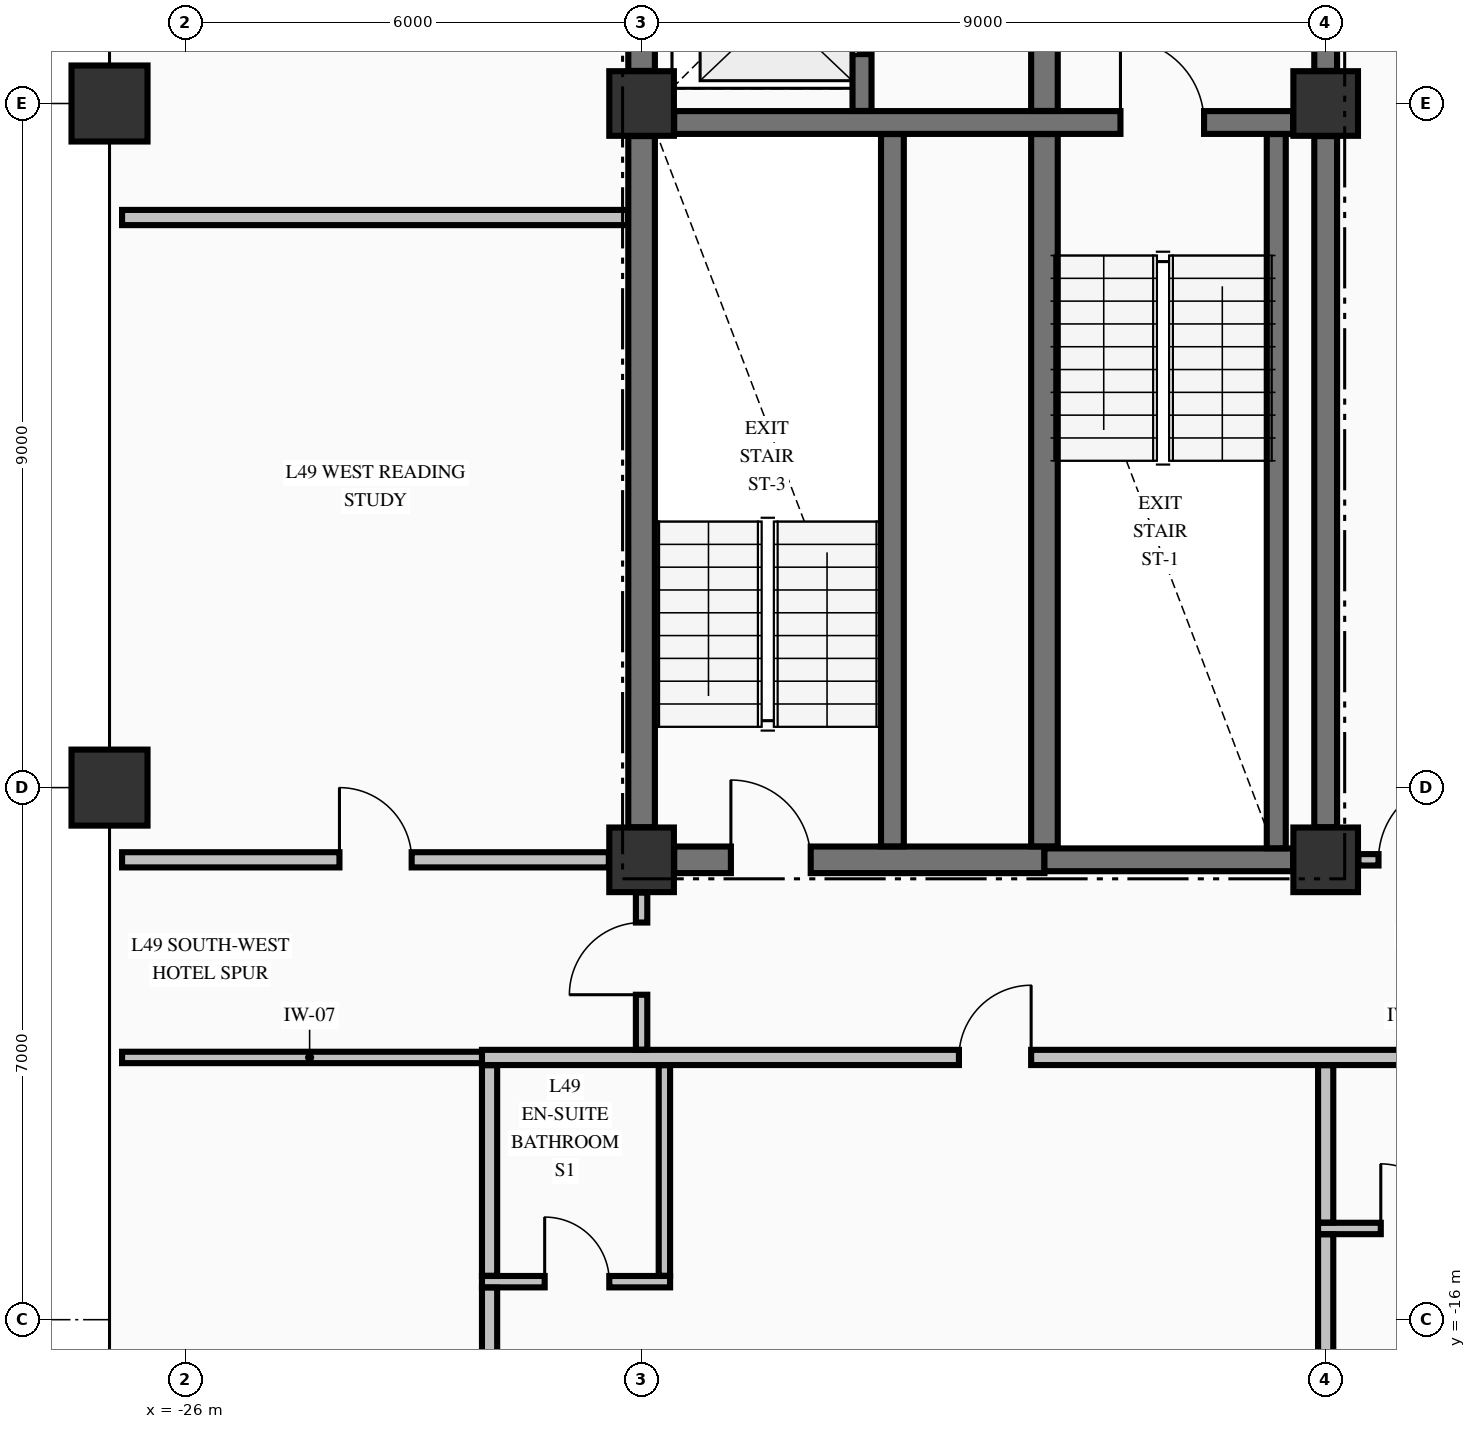
"""IFC4 building model, lengths in metres.
Left out: names, types, materials, properties, quantities, classifications, styles, units other than length and angle.
Written with IfcOpenShell. Run it as: python <this file> out.ifc"""

import sys

from ifc_helpers import new_model, si_unit, direction, frame, frame_2d, origin, origin_2d, place, context, subcontext, project, spatial, rectangle, extrude, element, fill, save


model = new_model("IFC4")
c1 = context("Model", 3, precision=1e-05, world=origin(), true_north=direction((0.0, 1.0)))
c2 = subcontext(c1, "Body", "Model", "MODEL_VIEW")
j1 = project(units=[si_unit("LENGTHUNIT", "METRE"), si_unit("PLANEANGLEUNIT", "RADIAN")], contexts=[c1])
p1 = place(None, origin())
s1 = spatial("IfcSite", under=j1, at=p1, CompositionType="ELEMENT")
p2 = place(p1, origin())
s2 = spatial("IfcBuilding", under=s1, at=p2, CompositionType="ELEMENT")
p3 = place(p2, frame((0.0, 0.0, 191.46)))
s3 = spatial("IfcBuildingStorey", under=s2, at=p3, CompositionType="ELEMENT", Elevation=191.46)
for number, where, z_axis, x_axis in (
    (1, (-27.0, -9.0, -0.425), (0.0, 0.0, 1.0), (1.0, 0.0, 0.0)),
    (2, (-27.0, 0.0, -0.425), (0.0, 0.0, 1.0), (1.0, 0.0, 0.0)),
):
    element("IfcColumn", number, at=place(p3, frame(where, z_axis=z_axis, x_axis=x_axis)), inside=s3, PredefinedType="COLUMN", context=c2, shape_type="SweptSolid", body=[
        extrude(rectangle(XDim=1.0, YDim=1.0, at=origin_2d()), origin(), (0.0, 0.0, 1.0), 3.55),
    ])
for number, where, z_axis, x_axis in (
    (3, (-20.0, -9.95, -0.425), (0.0, 0.0, 1.0), (1.0, 0.0, 0.0)),
    (4, (-11.0, -9.95, -0.425), (0.0, 0.0, 1.0), (1.0, 0.0, 0.0)),
    (5, (-11.0, 0.0, -0.425), (0.0, 0.0, 1.0), (1.0, 0.0, 0.0)),
    (6, (-20.0, 0.0, -0.425), (0.0, 0.0, 1.0), (1.0, 0.0, 0.0)),
):
    element("IfcColumn", number, at=place(p3, frame(where, z_axis=z_axis, x_axis=x_axis)), inside=s3, PredefinedType="COLUMN", context=c2, shape_type="SweptSolid", body=[
        extrude(rectangle(XDim=0.85, YDim=0.85, at=origin_2d()), origin(), (0.0, 0.0, 1.0), 3.55),
    ])
p4 = place(p3, frame((-19.571, -9.95, 0.0), z_axis=(0.0, 0.0, 1.0), x_axis=(1.0, 0.0, 0.0)))
e7 = element("IfcWall", 7, at=p4, inside=s3, PredefinedType="SHEAR", context=c2, shape_type="SweptSolid", body=[
    extrude(rectangle(XDim=4.871, YDim=0.35, at=frame_2d((2.436, 0.0))), origin(), (0.0, 0.0, 1.0), 3.125),
])
p5 = place(p4, frame((0.746, 0.0, 0.0)))
e8 = element("IfcOpeningElement", 8, at=p5, cuts=e7, PredefinedType="OPENING", context=c2, shape_type="SweptSolid", body=[
    extrude(rectangle(XDim=1.05, YDim=2.15, at=frame_2d((0.525, 1.075))), frame((0.0, 0.185, 0.0), z_axis=(0.0, -1.0, 0.0), x_axis=(1.0, 0.0, 0.0)), (0.0, 0.0, 1.0), 0.37),
])
p6 = place(p3, frame((-14.7, -9.95, 0.0), z_axis=(0.0, 0.0, 1.0), x_axis=(1.0, 0.0, 0.0)))
e9 = element("IfcWall", 9, at=p6, inside=s3, PredefinedType="SHEAR", context=c2, shape_type="SweptSolid", body=[
    extrude(rectangle(XDim=3.271, YDim=0.3, at=frame_2d((1.635, 0.0))), origin(), (0.0, 0.0, 1.0), 3.125),
])
p7 = place(p3, frame((-19.571, -0.25, 0.0), z_axis=(0.0, 0.0, 1.0), x_axis=(1.0, 0.0, 0.0)))
e10 = element("IfcWall", 10, at=p7, inside=s3, PredefinedType="SHEAR", context=c2, shape_type="SweptSolid", body=[
    extrude(rectangle(XDim=8.142, YDim=0.3, at=frame_2d((4.071, 0.0))), origin(), (0.0, 0.0, 1.0), 3.125),
])
p8 = place(p7, frame((5.871, 0.0, 0.0)))
e11 = element("IfcOpeningElement", 11, at=p8, cuts=e10, PredefinedType="OPENING", context=c2, shape_type="SweptSolid", body=[
    extrude(rectangle(XDim=1.1, YDim=2.15, at=frame_2d((0.55, 1.075))), frame((0.0, 0.16, 0.0), z_axis=(0.0, -1.0, 0.0), x_axis=(1.0, 0.0, 0.0)), (0.0, 0.0, 1.0), 0.32),
])
p9 = place(p3, frame((-22.1, -15.5, 0.0), z_axis=(0.0, 0.0, 1.0), x_axis=(1.0, 0.0, 0.0)))
e12 = element("IfcWall", 12, at=p9, inside=s3, PredefinedType="PARTITIONING", context=c2, shape_type="SweptSolid", body=[
    extrude(rectangle(XDim=2.475, YDim=0.15, at=frame_2d((1.238, 0.0))), origin(), (0.0, 0.0, 1.0), 3.125),
])
p10 = place(p9, frame((0.825, 0.0, 0.0)))
e13 = element("IfcOpeningElement", 13, at=p10, cuts=e12, PredefinedType="OPENING", context=c2, shape_type="SweptSolid", body=[
    extrude(rectangle(XDim=0.85, YDim=2.1, at=frame_2d((0.425, 1.05))), frame((0.0, 0.085, 0.0), z_axis=(0.0, -1.0, 0.0), x_axis=(1.0, 0.0, 0.0)), (0.0, 0.0, 1.0), 0.17),
])
p11 = place(p3, frame((-11.1, -14.8, 0.0), z_axis=(0.0, 0.0, 1.0), x_axis=(1.0, 0.0, 0.0)))
e14 = element("IfcWall", 14, at=p11, inside=s3, PredefinedType="PARTITIONING", context=c2, shape_type="SweptSolid", body=[
    extrude(rectangle(XDim=2.475, YDim=0.15, at=frame_2d((1.238, 0.0))), origin(), (0.0, 0.0, 1.0), 3.125),
])
p12 = place(p11, frame((0.825, 0.0, 0.0)))
e15 = element("IfcOpeningElement", 15, at=p12, cuts=e14, PredefinedType="OPENING", context=c2, shape_type="SweptSolid", body=[
    extrude(rectangle(XDim=0.85, YDim=2.1, at=frame_2d((0.425, 1.05))), frame((0.0, 0.085, 0.0), z_axis=(0.0, -1.0, 0.0), x_axis=(1.0, 0.0, 0.0)), (0.0, 0.0, 1.0), 0.17),
])
p13 = place(p3, frame((-26.835, -12.55, 0.0), z_axis=(0.0, 0.0, 1.0), x_axis=(1.0, 0.0, 0.0)))
e16 = element("IfcWall", 16, at=p13, inside=s3, PredefinedType="PARTITIONING", context=c2, shape_type="SweptSolid", body=[
    extrude(rectangle(XDim=4.935, YDim=0.15, at=frame_2d((2.468, 0.0))), origin(), (0.0, 0.0, 1.0), 3.125),
])
p14 = place(p3, frame((-22.1, -12.55, 0.0), z_axis=(0.0, 0.0, 1.0), x_axis=(1.0, 0.0, 0.0)))
e17 = element("IfcWall", 17, at=p14, inside=s3, PredefinedType="PARTITIONING", context=c2, shape_type="SweptSolid", body=[
    extrude(rectangle(XDim=39.2, YDim=0.2, at=frame_2d((19.6, 0.0))), origin(), (0.0, 0.0, 1.0), 3.125),
])
p15 = place(p14, frame((6.275, 0.0, 0.0)))
e18 = element("IfcOpeningElement", 18, at=p15, cuts=e17, PredefinedType="OPENING", context=c2, shape_type="SweptSolid", body=[
    extrude(rectangle(XDim=0.95, YDim=2.15, at=frame_2d((0.475, 1.075))), frame((0.0, 0.11, 0.0), z_axis=(0.0, -1.0, 0.0), x_axis=(1.0, 0.0, 0.0)), (0.0, 0.0, 1.0), 0.22),
])
p16 = place(p14, frame((17.275, 0.0, 0.0)))
e19 = element("IfcOpeningElement", 19, at=p16, cuts=e17, PredefinedType="OPENING", context=c2, shape_type="SweptSolid", body=[
    extrude(rectangle(XDim=0.95, YDim=2.15, at=frame_2d((0.475, 1.075))), frame((0.0, 0.11, 0.0), z_axis=(0.0, -1.0, 0.0), x_axis=(1.0, 0.0, 0.0)), (0.0, 0.0, 1.0), 0.22),
])
p17 = place(p14, frame((27.025, 0.0, 0.0)))
e20 = element("IfcOpeningElement", 20, at=p17, cuts=e17, PredefinedType="OPENING", context=c2, shape_type="SweptSolid", body=[
    extrude(rectangle(XDim=0.95, YDim=2.15, at=frame_2d((0.475, 1.075))), frame((0.0, 0.11, 0.0), z_axis=(0.0, -1.0, 0.0), x_axis=(1.0, 0.0, 0.0)), (0.0, 0.0, 1.0), 0.22),
])
p18 = place(p14, frame((35.525, 0.0, 0.0)))
e21 = element("IfcOpeningElement", 21, at=p18, cuts=e17, PredefinedType="OPENING", context=c2, shape_type="SweptSolid", body=[
    extrude(rectangle(XDim=0.95, YDim=2.15, at=frame_2d((0.475, 1.075))), frame((0.0, 0.11, 0.0), z_axis=(0.0, -1.0, 0.0), x_axis=(1.0, 0.0, 0.0)), (0.0, 0.0, 1.0), 0.22),
])
p19 = place(p3, frame((-26.835, -9.95, 0.0), z_axis=(0.0, 0.0, 1.0), x_axis=(1.0, 0.0, 0.0)))
e22 = element("IfcWall", 22, at=p19, inside=s3, PredefinedType="PARTITIONING", context=c2, shape_type="SweptSolid", body=[
    extrude(rectangle(XDim=6.404, YDim=0.2, at=frame_2d((3.202, 0.0))), origin(), (0.0, 0.0, 1.0), 3.125),
])
p20 = place(p19, frame((2.86, 0.0, 0.0)))
e23 = element("IfcOpeningElement", 23, at=p20, cuts=e22, PredefinedType="OPENING", context=c2, shape_type="SweptSolid", body=[
    extrude(rectangle(XDim=0.95, YDim=2.15, at=frame_2d((0.475, 1.075))), frame((0.0, 0.11, 0.0), z_axis=(0.0, -1.0, 0.0), x_axis=(1.0, 0.0, 0.0)), (0.0, 0.0, 1.0), 0.22),
])
p21 = place(p3, frame((-10.569, -9.95, 0.0), z_axis=(0.0, 0.0, 1.0), x_axis=(1.0, 0.0, 0.0)))
e24 = element("IfcWall", 24, at=p21, inside=s3, PredefinedType="PARTITIONING", context=c2, shape_type="SweptSolid", body=[
    extrude(rectangle(XDim=21.138, YDim=0.15, at=frame_2d((10.569, 0.0))), origin(), (0.0, 0.0, 1.0), 3.125),
])
p22 = place(p21, frame((0.264, 0.0, 0.0)))
e25 = element("IfcOpeningElement", 25, at=p22, cuts=e24, PredefinedType="OPENING", context=c2, shape_type="SweptSolid", body=[
    extrude(rectangle(XDim=1.05, YDim=2.15, at=frame_2d((0.525, 1.075))), frame((0.0, 0.085, 0.0), z_axis=(0.0, -1.0, 0.0), x_axis=(1.0, 0.0, 0.0)), (0.0, 0.0, 1.0), 0.17),
])
p23 = place(p21, frame((19.824, 0.0, 0.0)))
e26 = element("IfcOpeningElement", 26, at=p23, cuts=e24, PredefinedType="OPENING", context=c2, shape_type="SweptSolid", body=[
    extrude(rectangle(XDim=1.05, YDim=2.15, at=frame_2d((0.525, 1.075))), frame((0.0, 0.085, 0.0), z_axis=(0.0, -1.0, 0.0), x_axis=(1.0, 0.0, 0.0)), (0.0, 0.0, 1.0), 0.17),
])
p24 = place(p21, frame((12.874, 0.0, 0.0)))
e27 = element("IfcOpeningElement", 27, at=p24, cuts=e24, PredefinedType="OPENING", context=c2, shape_type="SweptSolid", body=[
    extrude(rectangle(XDim=0.95, YDim=2.15, at=frame_2d((0.475, 1.075))), frame((0.0, 0.085, 0.0), z_axis=(0.0, -1.0, 0.0), x_axis=(1.0, 0.0, 0.0)), (0.0, 0.0, 1.0), 0.17),
])
p25 = place(p3, frame((-26.835, -1.5, 0.0), z_axis=(0.0, 0.0, 1.0), x_axis=(1.0, 0.0, 0.0)))
e28 = element("IfcWall", 28, at=p25, inside=s3, PredefinedType="PARTITIONING", context=c2, shape_type="SweptSolid", body=[
    extrude(rectangle(XDim=6.657, YDim=0.2, at=frame_2d((3.329, 0.0))), origin(), (0.0, 0.0, 1.0), 3.125),
])
p26 = place(p3, frame((-20.0, -9.521, 0.0), z_axis=(0.0, 0.0, 1.0), x_axis=(0.0, 1.0, 0.0)))
e29 = element("IfcWall", 29, at=p26, inside=s3, PredefinedType="SHEAR", context=c2, shape_type="SweptSolid", body=[
    extrude(rectangle(XDim=9.092, YDim=0.35, at=frame_2d((4.546, 0.0))), origin(), (0.0, 0.0, 1.0), 3.125),
])
p27 = place(p3, frame((-20.0, 0.429, 0.0), z_axis=(0.0, 0.0, 1.0), x_axis=(0.0, 1.0, 0.0)))
e30 = element("IfcWall", 30, at=p27, inside=s3, PredefinedType="SHEAR", context=c2, shape_type="SweptSolid", body=[
    extrude(rectangle(XDim=2.094, YDim=0.35, at=frame_2d((1.047, 0.0))), origin(), (0.0, 0.0, 1.0), 3.125),
])
p28 = place(p3, frame((-17.1, -0.098, 0.0), z_axis=(0.0, 0.0, 1.0), x_axis=(0.0, 1.0, 0.0)))
e31 = element("IfcWall", 31, at=p28, inside=s3, PredefinedType="SOLIDWALL", context=c2, shape_type="SweptSolid", body=[
    extrude(rectangle(XDim=2.621, YDim=0.25, at=frame_2d((1.311, 0.0))), origin(), (0.0, 0.0, 1.0), 3.125),
])
p29 = place(p28, frame((0.748, 0.0, 0.0)))
e32 = element("IfcOpeningElement", 32, at=p29, cuts=e31, PredefinedType="OPENING", context=c2, shape_type="SweptSolid", body=[
    extrude(rectangle(XDim=1.1, YDim=2.2, at=frame_2d((0.55, 1.1))), frame((0.0, 0.135, 0.0), z_axis=(0.0, -1.0, 0.0), x_axis=(1.0, 0.0, 0.0)), (0.0, 0.0, 1.0), 0.27),
])
p30 = place(p3, frame((-16.7, -9.773, 0.0), z_axis=(0.0, 0.0, 1.0), x_axis=(0.0, 1.0, 0.0)))
e33 = element("IfcWall", 33, at=p30, inside=s3, PredefinedType="SHEAR", context=c2, shape_type="SweptSolid", body=[
    extrude(rectangle(XDim=9.371, YDim=0.3, at=frame_2d((4.686, 0.0))), origin(), (0.0, 0.0, 1.0), 3.125),
])
p31 = place(p3, frame((-14.7, -9.773, 0.0), z_axis=(0.0, 0.0, 1.0), x_axis=(0.0, 1.0, 0.0)))
e34 = element("IfcWall", 34, at=p31, inside=s3, PredefinedType="SHEAR", context=c2, shape_type="SweptSolid", body=[
    extrude(rectangle(XDim=9.371, YDim=0.35, at=frame_2d((4.686, 0.0))), origin(), (0.0, 0.0, 1.0), 3.125),
])
p32 = place(p3, frame((-14.7, -0.098, 0.0), z_axis=(0.0, 0.0, 1.0), x_axis=(0.0, 1.0, 0.0)))
e35 = element("IfcWall", 35, at=p32, inside=s3, PredefinedType="SHEAR", context=c2, shape_type="SweptSolid", body=[
    extrude(rectangle(XDim=2.846, YDim=0.35, at=frame_2d((1.423, 0.0))), origin(), (0.0, 0.0, 1.0), 3.125),
])
p33 = place(p3, frame((-11.65, -9.798, 0.0), z_axis=(0.0, 0.0, 1.0), x_axis=(0.0, 1.0, 0.0)))
e36 = element("IfcWall", 36, at=p33, inside=s3, PredefinedType="SOLIDWALL", context=c2, shape_type="SweptSolid", body=[
    extrude(rectangle(XDim=9.396, YDim=0.25, at=frame_2d((4.698, 0.0))), origin(), (0.0, 0.0, 1.0), 3.125),
])
p34 = place(p3, frame((-11.0, -9.521, 0.0), z_axis=(0.0, 0.0, 1.0), x_axis=(0.0, 1.0, 0.0)))
e37 = element("IfcWall", 37, at=p34, inside=s3, PredefinedType="SHEAR", context=c2, shape_type="SweptSolid", body=[
    extrude(rectangle(XDim=9.092, YDim=0.3, at=frame_2d((4.546, 0.0))), origin(), (0.0, 0.0, 1.0), 3.125),
])
p35 = place(p3, frame((-11.0, 0.429, 0.0), z_axis=(0.0, 0.0, 1.0), x_axis=(0.0, 1.0, 0.0)))
e38 = element("IfcWall", 38, at=p35, inside=s3, PredefinedType="SHEAR", context=c2, shape_type="SweptSolid", body=[
    extrude(rectangle(XDim=2.319, YDim=0.3, at=frame_2d((1.16, 0.0))), origin(), (0.0, 0.0, 1.0), 3.125),
])
p36 = place(p35, frame((0.671, 0.0, 0.0)))
e39 = element("IfcOpeningElement", 39, at=p36, cuts=e38, PredefinedType="OPENING", context=c2, shape_type="SweptSolid", body=[
    extrude(rectangle(XDim=1.1, YDim=2.15, at=frame_2d((0.55, 1.075))), frame((0.0, 0.16, 0.0), z_axis=(0.0, -1.0, 0.0), x_axis=(1.0, 0.0, 0.0)), (0.0, 0.0, 1.0), 0.32),
])
p37 = place(p3, frame((-22.0, -18.994, 0.0), z_axis=(0.0, 0.0, 1.0), x_axis=(0.0, 1.0, 0.0)))
e40 = element("IfcWall", 40, at=p37, inside=s3, PredefinedType="PARTITIONING", context=c2, shape_type="SweptSolid", body=[
    extrude(rectangle(XDim=3.416, YDim=0.2, at=frame_2d((1.708, 0.0))), origin(), (0.0, 0.0, 1.0), 3.125),
])
p38 = place(p3, frame((-22.0, -15.422, 0.0), z_axis=(0.0, 0.0, 1.0), x_axis=(0.0, 1.0, 0.0)))
e41 = element("IfcWall", 41, at=p38, inside=s3, PredefinedType="PARTITIONING", context=c2, shape_type="SweptSolid", body=[
    extrude(rectangle(XDim=2.769, YDim=0.2, at=frame_2d((1.385, 0.0))), origin(), (0.0, 0.0, 1.0), 3.125),
])
p39 = place(p3, frame((-20.0, -12.447, 0.0), z_axis=(0.0, 0.0, 1.0), x_axis=(0.0, 1.0, 0.0)))
e42 = element("IfcWall", 42, at=p39, inside=s3, PredefinedType="PARTITIONING", context=c2, shape_type="SweptSolid", body=[
    extrude(rectangle(XDim=2.066, YDim=0.15, at=frame_2d((1.033, 0.0))), origin(), (0.0, 0.0, 1.0), 2.317),
])
p40 = place(p39, frame((0.722, 0.0, 0.0)))
e43 = element("IfcOpeningElement", 43, at=p40, cuts=e42, PredefinedType="OPENING", context=c2, shape_type="SweptSolid", body=[
    extrude(rectangle(XDim=0.95, YDim=2.15, at=frame_2d((0.475, 1.075))), frame((0.0, 0.085, 0.0), z_axis=(0.0, -1.0, 0.0), x_axis=(1.0, 0.0, 0.0)), (0.0, 0.0, 1.0), 0.17),
])
p41 = place(p3, frame((-19.7, -15.422, 0.0), z_axis=(0.0, 0.0, 1.0), x_axis=(0.0, 1.0, 0.0)))
e44 = element("IfcWall", 44, at=p41, inside=s3, PredefinedType="PARTITIONING", context=c2, shape_type="SweptSolid", body=[
    extrude(rectangle(XDim=2.769, YDim=0.15, at=frame_2d((1.385, 0.0))), origin(), (0.0, 0.0, 1.0), 2.317),
])
p42 = place(p3, frame((-11.0, -23.994, 0.0), z_axis=(0.0, 0.0, 1.0), x_axis=(0.0, 1.0, 0.0)))
e45 = element("IfcWall", 45, at=p42, inside=s3, PredefinedType="PARTITIONING", context=c2, shape_type="SweptSolid", body=[
    extrude(rectangle(XDim=9.116, YDim=0.2, at=frame_2d((4.558, 0.0))), origin(), (0.0, 0.0, 1.0), 2.317),
])
p43 = place(p3, frame((-11.0, -14.722, 0.0), z_axis=(0.0, 0.0, 1.0), x_axis=(0.0, 1.0, 0.0)))
e46 = element("IfcWall", 46, at=p43, inside=s3, PredefinedType="PARTITIONING", context=c2, shape_type="SweptSolid", body=[
    extrude(rectangle(XDim=2.069, YDim=0.2, at=frame_2d((1.034, 0.0))), origin(), (0.0, 0.0, 1.0), 2.317),
])
p44 = place(p8, origin())
e47 = element("IfcDoor", 47, at=p44, inside=s3, OperationType="SINGLE_SWING_LEFT", PredefinedType="DOOR", context=c2, shape_type="SweptSolid", body=[
    extrude(rectangle(XDim=1.1, YDim=2.15, at=frame_2d((0.55, 1.075))), frame((0.0, 0.025, 0.0), z_axis=(0.0, -1.0, 0.0), x_axis=(1.0, 0.0, 0.0)), (0.0, 0.0, 1.0), 0.05),
])
fill(e11, e47)
p45 = place(p5, origin())
e48 = element("IfcDoor", 48, at=p45, inside=s3, OperationType="SINGLE_SWING_LEFT", PredefinedType="DOOR", context=c2, shape_type="SweptSolid", body=[
    extrude(rectangle(XDim=1.05, YDim=2.15, at=frame_2d((0.525, 1.075))), frame((0.0, 0.025, 0.0), z_axis=(0.0, -1.0, 0.0), x_axis=(1.0, 0.0, 0.0)), (0.0, 0.0, 1.0), 0.05),
])
fill(e8, e48)
p46 = place(p29, origin())
e49 = element("IfcDoor", 49, at=p46, inside=s3, OperationType="SLIDING_TO_LEFT", PredefinedType="DOOR", context=c2, shape_type="SweptSolid", body=[
    extrude(rectangle(XDim=1.1, YDim=2.2, at=frame_2d((0.55, 1.1))), frame((0.0, 0.025, 0.0), z_axis=(0.0, -1.0, 0.0), x_axis=(1.0, 0.0, 0.0)), (0.0, 0.0, 1.0), 0.05),
])
fill(e32, e49)
p47 = place(p22, origin())
e50 = element("IfcDoor", 50, at=p47, inside=s3, OperationType="SINGLE_SWING_RIGHT", PredefinedType="DOOR", context=c2, shape_type="SweptSolid", body=[
    extrude(rectangle(XDim=1.05, YDim=2.15, at=frame_2d((0.525, 1.075))), frame((0.0, 0.025, 0.0), z_axis=(0.0, -1.0, 0.0), x_axis=(1.0, 0.0, 0.0)), (0.0, 0.0, 1.0), 0.05),
])
fill(e25, e50)
p48 = place(p15, origin())
e51 = element("IfcDoor", 51, at=p48, inside=s3, OperationType="SINGLE_SWING_RIGHT", PredefinedType="DOOR", context=c2, shape_type="SweptSolid", body=[
    extrude(rectangle(XDim=0.95, YDim=2.15, at=frame_2d((0.475, 1.075))), frame((0.0, 0.025, 0.0), z_axis=(0.0, -1.0, 0.0), x_axis=(1.0, 0.0, 0.0)), (0.0, 0.0, 1.0), 0.05),
])
fill(e18, e51)
p49 = place(p10, origin())
e52 = element("IfcDoor", 52, at=p49, inside=s3, OperationType="SINGLE_SWING_LEFT", PredefinedType="DOOR", context=c2, shape_type="SweptSolid", body=[
    extrude(rectangle(XDim=0.85, YDim=2.1, at=frame_2d((0.425, 1.05))), frame((0.0, 0.025, 0.0), z_axis=(0.0, -1.0, 0.0), x_axis=(1.0, 0.0, 0.0)), (0.0, 0.0, 1.0), 0.05),
])
fill(e13, e52)
p50 = place(p12, origin())
e53 = element("IfcDoor", 53, at=p50, inside=s3, OperationType="SINGLE_SWING_LEFT", PredefinedType="DOOR", context=c2, shape_type="SweptSolid", body=[
    extrude(rectangle(XDim=0.85, YDim=2.1, at=frame_2d((0.425, 1.05))), frame((0.0, 0.025, 0.0), z_axis=(0.0, -1.0, 0.0), x_axis=(1.0, 0.0, 0.0)), (0.0, 0.0, 1.0), 0.05),
])
fill(e15, e53)
p51 = place(p40, origin())
e54 = element("IfcDoor", 54, at=p51, inside=s3, OperationType="SINGLE_SWING_LEFT", PredefinedType="DOOR", context=c2, shape_type="SweptSolid", body=[
    extrude(rectangle(XDim=0.95, YDim=2.15, at=frame_2d((0.475, 1.075))), frame((0.0, 0.025, 0.0), z_axis=(0.0, -1.0, 0.0), x_axis=(1.0, 0.0, 0.0)), (0.0, 0.0, 1.0), 0.05),
])
fill(e43, e54)
p52 = place(p20, origin())
e55 = element("IfcDoor", 55, at=p52, inside=s3, OperationType="SINGLE_SWING_LEFT", PredefinedType="DOOR", context=c2, shape_type="SweptSolid", body=[
    extrude(rectangle(XDim=0.95, YDim=2.15, at=frame_2d((0.475, 1.075))), frame((0.0, 0.025, 0.0), z_axis=(0.0, -1.0, 0.0), x_axis=(1.0, 0.0, 0.0)), (0.0, 0.0, 1.0), 0.05),
])
fill(e23, e55)
save(model, sys.argv[1])
